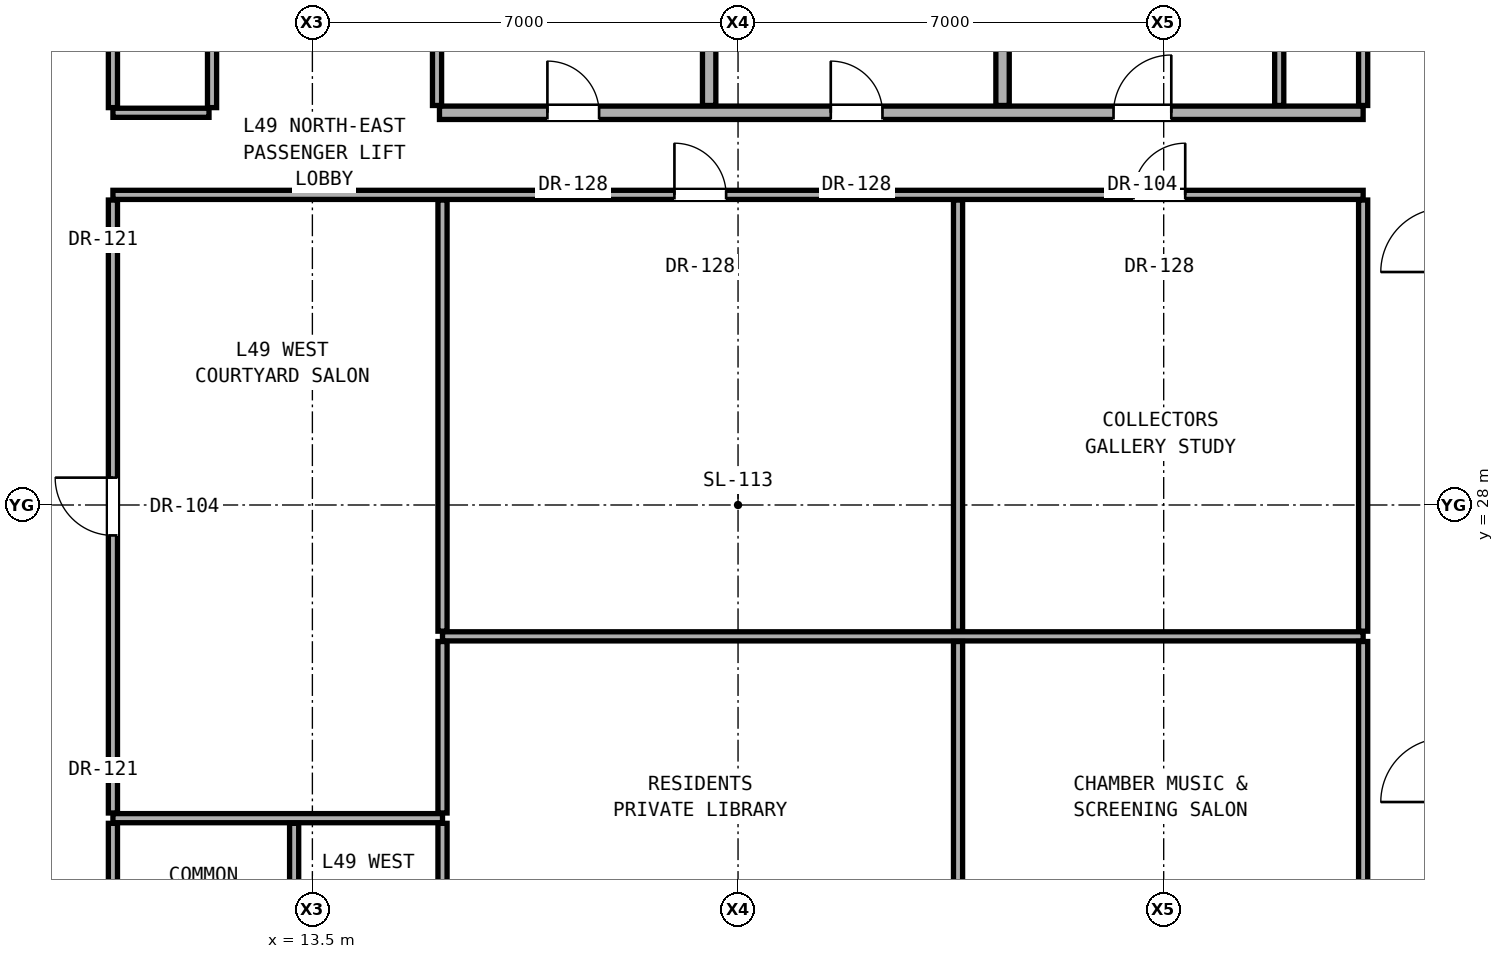
"""IFC4 building model, lengths in metres.
Left out: names, types, materials, properties, quantities, classifications, styles, units other than length and angle.
Written with IfcOpenShell. Run it as: python <this file> out.ifc"""

import sys

from ifc_helpers import new_model, si_unit, direction, frame, frame_2d, origin, place, context, subcontext, project, spatial, rectangle, extrude, element, fill, save


model = new_model("IFC4")
c1 = context("Model", 3, precision=1e-05, world=origin(), true_north=direction((0.0, 1.0)))
c2 = subcontext(c1, "Body", "Model", "MODEL_VIEW")
j1 = project(units=[si_unit("LENGTHUNIT", "METRE"), si_unit("PLANEANGLEUNIT", "RADIAN")], contexts=[c1])
p1 = place(None, origin())
s1 = spatial("IfcSite", under=j1, at=p1, CompositionType="ELEMENT")
p2 = place(p1, origin())
s2 = spatial("IfcBuilding", under=s1, at=p2, CompositionType="ELEMENT")
p3 = place(p2, frame((0.0, 0.0, 173.9)))
s3 = spatial("IfcBuildingStorey", under=s2, at=p3, CompositionType="ELEMENT", Elevation=173.9)
p4 = place(p3, frame((10.22, 22.85, 0.0), z_axis=(0.0, 0.0, 1.0), x_axis=(1.0, 0.0, 0.0)))
e1 = element("IfcWall", 1, at=p4, inside=s3, PredefinedType="PARTITIONING", context=c2, shape_type="SweptSolid", body=[
    extrude(rectangle(XDim=5.42, YDim=0.15, at=frame_2d((2.71, 0.0))), origin(), (0.0, 0.0, 1.0), 2.186),
])
p5 = place(p3, frame((15.64, 25.84, 0.0), z_axis=(0.0, 0.0, 1.0), x_axis=(1.0, 0.0, 0.0)))
e2 = element("IfcWall", 2, at=p5, inside=s3, PredefinedType="PARTITIONING", context=c2, shape_type="SweptSolid", body=[
    extrude(rectangle(XDim=15.14, YDim=0.15, at=frame_2d((7.57, 0.0))), origin(), (0.0, 0.0, 1.0), 2.186),
])
p6 = place(p3, frame((10.22, 33.1, 0.0), z_axis=(0.0, 0.0, 1.0), x_axis=(1.0, 0.0, 0.0)))
e3 = element("IfcWall", 3, at=p6, inside=s3, PredefinedType="PARTITIONING", context=c2, shape_type="SweptSolid", body=[
    extrude(rectangle(XDim=20.56, YDim=0.15, at=frame_2d((10.28, 0.0))), origin(), (0.0, 0.0, 1.0), 2.186),
])
p7 = place(p6, frame((9.234, 0.0, 0.0)))
e4 = element("IfcOpeningElement", 4, at=p7, cuts=e3, PredefinedType="OPENING", context=c2, shape_type="SweptSolid", body=[
    extrude(rectangle(XDim=0.85, YDim=2.01, at=frame_2d((0.425, 1.005))), frame((0.0, 0.085, 0.0), z_axis=(0.0, -1.0, 0.0), x_axis=(1.0, 0.0, 0.0)), (0.0, 0.0, 1.0), 0.17),
])
p8 = place(p6, frame((16.784, 0.0, 0.0)))
e5 = element("IfcOpeningElement", 5, at=p8, cuts=e3, PredefinedType="OPENING", context=c2, shape_type="SweptSolid", body=[
    extrude(rectangle(XDim=0.85, YDim=2.01, at=frame_2d((0.425, 1.005))), frame((0.0, 0.085, 0.0), z_axis=(0.0, -1.0, 0.0), x_axis=(1.0, 0.0, 0.0)), (0.0, 0.0, 1.0), 0.17),
])
p9 = place(p3, frame((10.22, 34.45, 0.0), z_axis=(0.0, 0.0, 1.0), x_axis=(1.0, 0.0, 0.0)))
e6 = element("IfcWall", 6, at=p9, inside=s3, PredefinedType="PARTITIONING", context=c2, shape_type="SweptSolid", body=[
    extrude(rectangle(XDim=1.58, YDim=0.15, at=frame_2d((0.79, 0.0))), origin(), (0.0, 0.0, 1.0), 2.186),
])
p10 = place(p3, frame((15.59, 34.45, 0.0), z_axis=(0.0, 0.0, 1.0), x_axis=(1.0, 0.0, 0.0)))
e7 = element("IfcWall", 7, at=p10, inside=s3, PredefinedType="SOLIDWALL", context=c2, shape_type="SweptSolid", body=[
    extrude(rectangle(XDim=15.19, YDim=0.22, at=frame_2d((7.595, 0.0))), origin(), (0.0, 0.0, 1.0), 2.186),
])
p11 = place(p10, frame((6.435, 0.0, 0.0)))
e8 = element("IfcOpeningElement", 8, at=p11, cuts=e7, PredefinedType="OPENING", context=c2, shape_type="SweptSolid", body=[
    extrude(rectangle(XDim=0.85, YDim=2.01, at=frame_2d((0.425, 1.005))), frame((0.0, 0.12, 0.0), z_axis=(0.0, -1.0, 0.0), x_axis=(1.0, 0.0, 0.0)), (0.0, 0.0, 1.0), 0.24),
])
p12 = place(p10, frame((11.085, 0.0, 0.0)))
e9 = element("IfcOpeningElement", 9, at=p12, cuts=e7, PredefinedType="OPENING", context=c2, shape_type="SweptSolid", body=[
    extrude(rectangle(XDim=0.95, YDim=2.15, at=frame_2d((0.475, 1.075))), frame((0.0, 0.12, 0.0), z_axis=(0.0, -1.0, 0.0), x_axis=(1.0, 0.0, 0.0)), (0.0, 0.0, 1.0), 0.24),
])
p13 = place(p10, frame((1.775, 0.0, 0.0)))
e10 = element("IfcOpeningElement", 10, at=p13, cuts=e7, PredefinedType="OPENING", context=c2, shape_type="SweptSolid", body=[
    extrude(rectangle(XDim=0.85, YDim=2.01, at=frame_2d((0.425, 1.005))), frame((0.0, 0.12, 0.0), z_axis=(0.0, -1.0, 0.0), x_axis=(1.0, 0.0, 0.0)), (0.0, 0.0, 1.0), 0.24),
])
p14 = place(p3, frame((10.22, 19.985, 0.0), z_axis=(0.0, 0.0, 1.0), x_axis=(0.0, 1.0, 0.0)))
e11 = element("IfcWall", 11, at=p14, inside=s3, PredefinedType="PARTITIONING", context=c2, shape_type="SweptSolid", body=[
    extrude(rectangle(XDim=2.78, YDim=0.15, at=frame_2d((1.39, 0.0))), origin(), (0.0, 0.0, 1.0), 3.05),
])
p15 = place(p3, frame((10.22, 22.935, 0.0), z_axis=(0.0, 0.0, 1.0), x_axis=(0.0, 1.0, 0.0)))
e12 = element("IfcWall", 12, at=p15, inside=s3, PredefinedType="PARTITIONING", context=c2, shape_type="SweptSolid", body=[
    extrude(rectangle(XDim=10.08, YDim=0.15, at=frame_2d((5.04, 0.0))), origin(), (0.0, 0.0, 1.0), 2.346),
])
p16 = place(p15, frame((4.565, 0.0, 0.0)))
e13 = element("IfcOpeningElement", 13, at=p16, cuts=e12, PredefinedType="OPENING", context=c2, shape_type="SweptSolid", body=[
    extrude(rectangle(XDim=0.95, YDim=2.15, at=frame_2d((0.475, 1.075))), frame((0.0, 0.085, 0.0), z_axis=(0.0, -1.0, 0.0), x_axis=(1.0, 0.0, 0.0)), (0.0, 0.0, 1.0), 0.17),
])
p17 = place(p3, frame((10.22, 34.535, 0.0), z_axis=(0.0, 0.0, 1.0), x_axis=(0.0, 1.0, 0.0)))
e14 = element("IfcWall", 14, at=p17, inside=s3, PredefinedType="PARTITIONING", context=c2, shape_type="SweptSolid", body=[
    extrude(rectangle(XDim=9.13, YDim=0.15, at=frame_2d((4.565, 0.0))), origin(), (0.0, 0.0, 1.0), 2.442),
])
p18 = place(p3, frame((11.85, 34.535, 0.0), z_axis=(0.0, 0.0, 1.0), x_axis=(0.0, 1.0, 0.0)))
e15 = element("IfcWall", 15, at=p18, inside=s3, PredefinedType="PARTITIONING", context=c2, shape_type="SweptSolid", body=[
    extrude(rectangle(XDim=2.795, YDim=0.15, at=frame_2d((1.397, 0.0))), origin(), (0.0, 0.0, 1.0), 3.05),
])
p19 = place(p3, frame((13.2, 19.985, 0.0), z_axis=(0.0, 0.0, 1.0), x_axis=(0.0, 1.0, 0.0)))
e16 = element("IfcWall", 16, at=p19, inside=s3, PredefinedType="PARTITIONING", context=c2, shape_type="SweptSolid", body=[
    extrude(rectangle(XDim=2.78, YDim=0.15, at=frame_2d((1.39, 0.0))), origin(), (0.0, 0.0, 1.0), 3.05),
])
p20 = place(p3, frame((15.64, 19.985, 0.0), z_axis=(0.0, 0.0, 1.0), x_axis=(0.0, 1.0, 0.0)))
e17 = element("IfcWall", 17, at=p20, inside=s3, PredefinedType="PARTITIONING", context=c2, shape_type="SweptSolid", body=[
    extrude(rectangle(XDim=2.78, YDim=0.15, at=frame_2d((1.39, 0.0))), origin(), (0.0, 0.0, 1.0), 2.625),
])
p21 = place(p3, frame((15.64, 22.935, 0.0), z_axis=(0.0, 0.0, 1.0), x_axis=(0.0, 1.0, 0.0)))
e18 = element("IfcWall", 18, at=p21, inside=s3, PredefinedType="PARTITIONING", context=c2, shape_type="SweptSolid", body=[
    extrude(rectangle(XDim=2.82, YDim=0.15, at=frame_2d((1.41, 0.0))), origin(), (0.0, 0.0, 1.0), 2.186),
])
p22 = place(p3, frame((15.64, 25.925, 0.0), z_axis=(0.0, 0.0, 1.0), x_axis=(0.0, 1.0, 0.0)))
e19 = element("IfcWall", 19, at=p22, inside=s3, PredefinedType="PARTITIONING", context=c2, shape_type="SweptSolid", body=[
    extrude(rectangle(XDim=7.09, YDim=0.15, at=frame_2d((3.545, 0.0))), origin(), (0.0, 0.0, 1.0), 2.186),
])
p23 = place(p3, frame((15.55, 34.57, 0.0), z_axis=(0.0, 0.0, 1.0), x_axis=(0.0, 1.0, 0.0)))
e20 = element("IfcWall", 20, at=p23, inside=s3, PredefinedType="PARTITIONING", context=c2, shape_type="SweptSolid", body=[
    extrude(rectangle(XDim=2.76, YDim=0.15, at=frame_2d((1.38, 0.0))), origin(), (0.0, 0.0, 1.0), 3.05),
])
p24 = place(p3, frame((20.025, 34.57, 0.0), z_axis=(0.0, 0.0, 1.0), x_axis=(0.0, 1.0, 0.0)))
e21 = element("IfcWall", 21, at=p24, inside=s3, PredefinedType="SOLIDWALL", context=c2, shape_type="SweptSolid", body=[
    extrude(rectangle(XDim=2.76, YDim=0.22, at=frame_2d((1.38, 0.0))), origin(), (0.0, 0.0, 1.0), 3.05),
])
p25 = place(p3, frame((24.118, 19.985, 0.0), z_axis=(0.0, 0.0, 1.0), x_axis=(0.0, 1.0, 0.0)))
e22 = element("IfcWall", 22, at=p25, inside=s3, PredefinedType="PARTITIONING", context=c2, shape_type="SweptSolid", body=[
    extrude(rectangle(XDim=5.77, YDim=0.15, at=frame_2d((2.885, 0.0))), origin(), (0.0, 0.0, 1.0), 2.186),
])
p26 = place(p3, frame((24.118, 25.925, 0.0), z_axis=(0.0, 0.0, 1.0), x_axis=(0.0, 1.0, 0.0)))
e23 = element("IfcWall", 23, at=p26, inside=s3, PredefinedType="PARTITIONING", context=c2, shape_type="SweptSolid", body=[
    extrude(rectangle(XDim=7.09, YDim=0.15, at=frame_2d((3.545, 0.0))), origin(), (0.0, 0.0, 1.0), 2.186),
])
p27 = place(p3, frame((24.85, 34.57, 0.0), z_axis=(0.0, 0.0, 1.0), x_axis=(0.0, 1.0, 0.0)))
e24 = element("IfcWall", 24, at=p27, inside=s3, PredefinedType="SOLIDWALL", context=c2, shape_type="SweptSolid", body=[
    extrude(rectangle(XDim=2.76, YDim=0.22, at=frame_2d((1.38, 0.0))), origin(), (0.0, 0.0, 1.0), 3.05),
])
p28 = place(p3, frame((29.4, 34.57, 0.0), z_axis=(0.0, 0.0, 1.0), x_axis=(0.0, 1.0, 0.0)))
e25 = element("IfcWall", 25, at=p28, inside=s3, PredefinedType="PARTITIONING", context=c2, shape_type="SweptSolid", body=[
    extrude(rectangle(XDim=2.76, YDim=0.15, at=frame_2d((1.38, 0.0))), origin(), (0.0, 0.0, 1.0), 3.05),
])
p29 = place(p3, frame((30.78, 19.985, 0.0), z_axis=(0.0, 0.0, 1.0), x_axis=(0.0, 1.0, 0.0)))
e26 = element("IfcWall", 26, at=p29, inside=s3, PredefinedType="PARTITIONING", context=c2, shape_type="SweptSolid", body=[
    extrude(rectangle(XDim=5.77, YDim=0.15, at=frame_2d((2.885, 0.0))), origin(), (0.0, 0.0, 1.0), 2.346),
])
p30 = place(p3, frame((30.78, 25.925, 0.0), z_axis=(0.0, 0.0, 1.0), x_axis=(0.0, 1.0, 0.0)))
e27 = element("IfcWall", 27, at=p30, inside=s3, PredefinedType="PARTITIONING", context=c2, shape_type="SweptSolid", body=[
    extrude(rectangle(XDim=7.09, YDim=0.15, at=frame_2d((3.545, 0.0))), origin(), (0.0, 0.0, 1.0), 2.346),
])
p31 = place(p3, frame((30.78, 34.57, 0.0), z_axis=(0.0, 0.0, 1.0), x_axis=(0.0, 1.0, 0.0)))
e28 = element("IfcWall", 28, at=p31, inside=s3, PredefinedType="PARTITIONING", context=c2, shape_type="SweptSolid", body=[
    extrude(rectangle(XDim=9.095, YDim=0.15, at=frame_2d((4.547, 0.0))), origin(), (0.0, 0.0, 1.0), 2.442),
])
p32 = place(p11, origin())
e29 = element("IfcDoor", 29, at=p32, inside=s3, OperationType="SINGLE_SWING_LEFT", PredefinedType="DOOR", context=c2, shape_type="SweptSolid", body=[
    extrude(rectangle(XDim=0.85, YDim=2.01, at=frame_2d((0.425, 1.005))), frame((0.0, 0.025, 0.0), z_axis=(0.0, -1.0, 0.0), x_axis=(1.0, 0.0, 0.0)), (0.0, 0.0, 1.0), 0.05),
])
fill(e8, e29)
p33 = place(p12, origin())
e30 = element("IfcDoor", 30, at=p33, inside=s3, OperationType="SINGLE_SWING_RIGHT", PredefinedType="DOOR", context=c2, shape_type="SweptSolid", body=[
    extrude(rectangle(XDim=0.95, YDim=2.15, at=frame_2d((0.475, 1.075))), frame((0.0, 0.025, 0.0), z_axis=(0.0, -1.0, 0.0), x_axis=(1.0, 0.0, 0.0)), (0.0, 0.0, 1.0), 0.05),
])
fill(e9, e30)
p34 = place(p13, origin())
e31 = element("IfcDoor", 31, at=p34, inside=s3, OperationType="SINGLE_SWING_LEFT", PredefinedType="DOOR", context=c2, shape_type="SweptSolid", body=[
    extrude(rectangle(XDim=0.85, YDim=2.01, at=frame_2d((0.425, 1.005))), frame((0.0, 0.025, 0.0), z_axis=(0.0, -1.0, 0.0), x_axis=(1.0, 0.0, 0.0)), (0.0, 0.0, 1.0), 0.05),
])
fill(e10, e31)
p35 = place(p16, origin())
e32 = element("IfcDoor", 32, at=p35, inside=s3, OperationType="SINGLE_SWING_RIGHT", PredefinedType="DOOR", context=c2, shape_type="SweptSolid", body=[
    extrude(rectangle(XDim=0.95, YDim=2.15, at=frame_2d((0.475, 1.075))), frame((0.0, 0.025, 0.0), z_axis=(0.0, -1.0, 0.0), x_axis=(1.0, 0.0, 0.0)), (0.0, 0.0, 1.0), 0.05),
])
fill(e13, e32)
p36 = place(p7, origin())
e33 = element("IfcDoor", 33, at=p36, inside=s3, OperationType="SINGLE_SWING_LEFT", PredefinedType="DOOR", context=c2, shape_type="SweptSolid", body=[
    extrude(rectangle(XDim=0.85, YDim=2.01, at=frame_2d((0.425, 1.005))), frame((0.0, 0.025, 0.0), z_axis=(0.0, -1.0, 0.0), x_axis=(1.0, 0.0, 0.0)), (0.0, 0.0, 1.0), 0.05),
])
fill(e4, e33)
p37 = place(p8, origin())
e34 = element("IfcDoor", 34, at=p37, inside=s3, OperationType="SINGLE_SWING_RIGHT", PredefinedType="DOOR", context=c2, shape_type="SweptSolid", body=[
    extrude(rectangle(XDim=0.85, YDim=2.01, at=frame_2d((0.425, 1.005))), frame((0.0, 0.025, 0.0), z_axis=(0.0, -1.0, 0.0), x_axis=(1.0, 0.0, 0.0)), (0.0, 0.0, 1.0), 0.05),
])
fill(e5, e34)
save(model, sys.argv[1])
